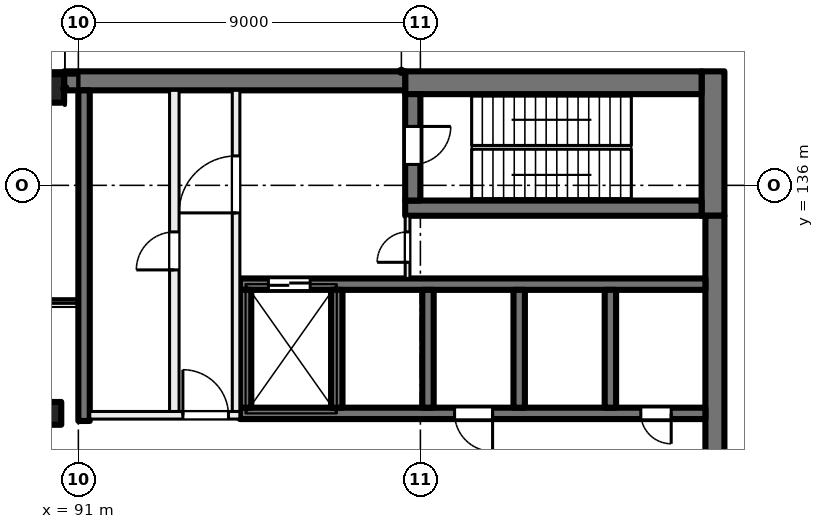
"""IFC4 building model, lengths in metres.
Left out: names, types, materials, properties, quantities, classifications, styles, units other than length and angle.
Written with IfcOpenShell. Run it as: python <this file> out.ifc"""

import sys

from ifc_helpers import new_model, si_unit, direction, frame, frame_2d, origin, origin_2d, place, context, subcontext, project, spatial, rectangle, extrude, element, fill, save


model = new_model("IFC4")
c1 = context("Model", 3, precision=1e-05, world=origin(), true_north=direction((0.0, 1.0)))
c2 = subcontext(c1, "Body", "Model", "MODEL_VIEW")
j1 = project(units=[si_unit("LENGTHUNIT", "METRE"), si_unit("PLANEANGLEUNIT", "RADIAN")], contexts=[c1])
p1 = place(None, origin())
s1 = spatial("IfcSite", under=j1, at=p1, CompositionType="ELEMENT")
p2 = place(p1, origin())
s2 = spatial("IfcBuilding", under=s1, at=p2, CompositionType="ELEMENT")
p3 = place(p2, frame((0.0, 0.0, 236.0)))
s3 = spatial("IfcBuildingStorey", under=s2, at=p3, CompositionType="ELEMENT", Elevation=236.0)
p4 = place(p3, frame((90.25, 130.0, 0.0), z_axis=(0.0, 0.0, 1.0), x_axis=(1.0, 0.0, 0.0)))
e1 = element("IfcColumn", 1, at=p4, inside=s3, PredefinedType="COLUMN", context=c2, shape_type="SweptSolid", body=[
    extrude(rectangle(XDim=0.6, YDim=0.6, at=origin_2d()), origin(), (0.0, 0.0, 1.0), 5.5),
])
p5 = place(p3, frame((90.25, 138.55, 0.0), z_axis=(0.0, 0.0, 1.0), x_axis=(1.0, 0.0, 0.0)))
e2 = element("IfcColumn", 2, at=p5, inside=s3, PredefinedType="COLUMN", context=c2, shape_type="SweptSolid", body=[
    extrude(rectangle(XDim=0.75, YDim=0.75, at=origin_2d()), origin(), (0.0, 0.0, 1.0), 5.5),
])
p6 = place(p3, frame((107.7, 139.0, 0.0), z_axis=(0.0, 0.0, 1.0), x_axis=(0.0, -1.0, 0.0)))
e3 = element("IfcWall", 3, at=p6, inside=s3, PredefinedType="SHEAR", context=c2, shape_type="SweptSolid", body=[
    extrude(rectangle(XDim=3.8, YDim=0.6, at=frame_2d((1.9, 0.0))), origin(), (0.0, 0.0, 1.0), 5.5),
])
p7 = place(p3, frame((107.75, 135.2, 0.0), z_axis=(0.0, 0.0, 1.0), x_axis=(0.0, -1.0, 0.0)))
e4 = element("IfcWall", 4, at=p7, inside=s3, PredefinedType="SHEAR", context=c2, shape_type="SweptSolid", body=[
    extrude(rectangle(XDim=14.4, YDim=0.5, at=frame_2d((7.2, 0.0))), origin(), (0.0, 0.0, 1.0), 5.5),
])
p8 = place(p3, frame((107.4, 138.7, 0.0), z_axis=(0.0, 0.0, 1.0), x_axis=(-1.0, 0.0, 0.0)))
e5 = element("IfcWall", 5, at=p8, inside=s3, PredefinedType="SHEAR", context=c2, shape_type="SweptSolid", body=[
    extrude(rectangle(XDim=7.8, YDim=0.6, at=frame_2d((3.9, 0.0))), origin(), (0.0, 0.0, 1.0), 5.5),
])
p9 = place(p3, frame((99.6, 138.75, 0.0), z_axis=(0.0, 0.0, 1.0), x_axis=(-1.0, 0.0, 0.0)))
e6 = element("IfcWall", 6, at=p9, inside=s3, PredefinedType="SHEAR", context=c2, shape_type="SweptSolid", body=[
    extrude(rectangle(XDim=8.975, YDim=0.5, at=frame_2d((4.488, 0.0))), origin(), (0.0, 0.0, 1.0), 5.5),
])
p10 = place(p3, frame((107.4, 135.4, 0.0), z_axis=(0.0, 0.0, 1.0), x_axis=(-1.0, 0.0, 0.0)))
e7 = element("IfcWall", 7, at=p10, inside=s3, PredefinedType="SHEAR", context=c2, shape_type="SweptSolid", body=[
    extrude(rectangle(XDim=7.8, YDim=0.4, at=frame_2d((3.9, 0.0))), origin(), (0.0, 0.0, 1.0), 5.5),
])
p11 = place(p3, frame((99.8, 138.4, 0.0), z_axis=(0.0, 0.0, 1.0), x_axis=(0.0, -1.0, 0.0)))
e8 = element("IfcWall", 8, at=p11, inside=s3, PredefinedType="SHEAR", context=c2, shape_type="SweptSolid", body=[
    extrude(rectangle(XDim=2.8, YDim=0.4, at=frame_2d((1.4, 0.0))), origin(), (0.0, 0.0, 1.0), 5.5),
])
p12 = place(p11, frame((0.85, 0.0, 0.0)))
e9 = element("IfcOpeningElement", 9, at=p12, cuts=e8, PredefinedType="OPENING", context=c2, shape_type="SweptSolid", body=[
    extrude(rectangle(XDim=1.0, YDim=2.1, at=frame_2d((0.5, 1.05))), frame((0.0, 0.21, 0.0), z_axis=(0.0, -1.0, 0.0), x_axis=(1.0, 0.0, 0.0)), (0.0, 0.0, 1.0), 0.42),
])
p13 = place(p3, frame((107.5, 130.0, 0.0), z_axis=(0.0, 0.0, 1.0), x_axis=(-1.0, 0.0, 0.0)))
e10 = element("IfcWall", 10, at=p13, inside=s3, PredefinedType="SHEAR", context=c2, shape_type="SweptSolid", body=[
    extrude(rectangle(XDim=12.25, YDim=0.3, at=frame_2d((6.125, 0.0))), origin(), (0.0, 0.0, 1.0), 5.5),
])
p14 = place(p13, frame((0.9, 0.0, 0.0)))
e11 = element("IfcOpeningElement", 11, at=p14, cuts=e10, PredefinedType="OPENING", context=c2, shape_type="SweptSolid", body=[
    extrude(rectangle(XDim=0.8, YDim=2.1, at=frame_2d((0.4, 1.05))), frame((0.0, 0.16, 0.0), z_axis=(0.0, -1.0, 0.0), x_axis=(1.0, 0.0, 0.0)), (0.0, 0.0, 1.0), 0.32),
])
p15 = place(p13, frame((5.6, 0.0, 0.0)))
e12 = element("IfcOpeningElement", 12, at=p15, cuts=e10, PredefinedType="OPENING", context=c2, shape_type="SweptSolid", body=[
    extrude(rectangle(XDim=1.0, YDim=2.1, at=frame_2d((0.5, 1.05))), frame((0.0, 0.16, 0.0), z_axis=(0.0, -1.0, 0.0), x_axis=(1.0, 0.0, 0.0)), (0.0, 0.0, 1.0), 0.32),
])
p16 = place(p3, frame((107.5, 133.4, 0.0), z_axis=(0.0, 0.0, 1.0), x_axis=(-1.0, 0.0, 0.0)))
e13 = element("IfcWall", 13, at=p16, inside=s3, PredefinedType="SHEAR", context=c2, shape_type="SweptSolid", body=[
    extrude(rectangle(XDim=12.25, YDim=0.3, at=frame_2d((6.125, 0.0))), origin(), (0.0, 0.0, 1.0), 5.5),
])
p17 = place(p16, frame((10.4, 0.0, 0.0)))
e14 = element("IfcOpeningElement", 14, at=p17, cuts=e13, PredefinedType="OPENING", context=c2, shape_type="SweptSolid", body=[
    extrude(rectangle(XDim=1.1, YDim=2.1, at=frame_2d((0.55, 1.05))), frame((0.0, 0.16, 0.0), z_axis=(0.0, -1.0, 0.0), x_axis=(1.0, 0.0, 0.0)), (0.0, 0.0, 1.0), 0.32),
])
for number, where, z_axis, x_axis in (
    (15, (105.0, 133.25, 0.0), (0.0, 0.0, 1.0), (0.0, -1.0, 0.0)),
    (16, (102.6, 133.25, 0.0), (0.0, 0.0, 1.0), (0.0, -1.0, 0.0)),
    (17, (100.2, 133.25, 0.0), (0.0, 0.0, 1.0), (0.0, -1.0, 0.0)),
    (18, (97.8, 133.25, 0.0), (0.0, 0.0, 1.0), (0.0, -1.0, 0.0)),
    (19, (95.4, 133.25, 0.0), (0.0, 0.0, 1.0), (0.0, -1.0, 0.0)),
):
    element("IfcWall", number, at=place(p3, frame(where, z_axis=z_axis, x_axis=x_axis)), inside=s3, PredefinedType="SHEAR", context=c2, shape_type="SweptSolid", body=[
        extrude(rectangle(XDim=3.1, YDim=0.3, at=frame_2d((1.55, 0.0))), origin(), (0.0, 0.0, 1.0), 5.5),
    ])
p18 = place(p3, frame((91.15, 138.5, 0.0), z_axis=(0.0, 0.0, 1.0), x_axis=(0.0, -1.0, 0.0)))
e20 = element("IfcWall", 20, at=p18, inside=s3, PredefinedType="SHEAR", context=c2, shape_type="SweptSolid", body=[
    extrude(rectangle(XDim=8.7, YDim=0.3, at=frame_2d((4.35, 0.0))), origin(), (0.0, 0.0, 1.0), 5.5),
])
p19 = place(p3, frame((91.3, 129.95, 0.0), z_axis=(0.0, 0.0, 1.0), x_axis=(1.0, 0.0, 0.0)))
e21 = element("IfcWall", 21, at=p19, inside=s3, PredefinedType="PARTITIONING", context=c2, shape_type="SweptSolid", body=[
    extrude(rectangle(XDim=3.95, YDim=0.2, at=frame_2d((1.975, 0.0))), origin(), (0.0, 0.0, 1.0), 5.125),
])
p20 = place(p19, frame((2.45, 0.0, 0.0)))
e22 = element("IfcOpeningElement", 22, at=p20, cuts=e21, PredefinedType="OPENING", context=c2, shape_type="SweptSolid", body=[
    extrude(rectangle(XDim=1.2, YDim=2.1, at=frame_2d((0.6, 1.05))), frame((0.0, 0.11, 0.0), z_axis=(0.0, -1.0, 0.0), x_axis=(1.0, 0.0, 0.0)), (0.0, 0.0, 1.0), 0.22),
])
p21 = place(p3, frame((95.15, 130.05, 0.0), z_axis=(0.0, 0.0, 1.0), x_axis=(0.0, 1.0, 0.0)))
e23 = element("IfcWall", 23, at=p21, inside=s3, PredefinedType="PARTITIONING", context=c2, shape_type="SweptSolid", body=[
    extrude(rectangle(XDim=8.45, YDim=0.2, at=frame_2d((4.225, 0.0))), origin(), (0.0, 0.0, 1.0), 5.125),
])
p22 = place(p21, frame((5.225, 0.0, 0.0)))
e24 = element("IfcOpeningElement", 24, at=p22, cuts=e23, PredefinedType="OPENING", context=c2, shape_type="SweptSolid", body=[
    extrude(rectangle(XDim=1.5, YDim=2.1, at=frame_2d((0.75, 1.05))), frame((0.0, 0.11, 0.0), z_axis=(0.0, -1.0, 0.0), x_axis=(1.0, 0.0, 0.0)), (0.0, 0.0, 1.0), 0.22),
])
p23 = place(p3, frame((93.525, 130.05, 0.0), z_axis=(0.0, 0.0, 1.0), x_axis=(0.0, 1.0, 0.0)))
e25 = element("IfcWall", 25, at=p23, inside=s3, PredefinedType="PARTITIONING", context=c2, shape_type="SweptSolid", body=[
    extrude(rectangle(XDim=8.45, YDim=0.25, at=frame_2d((4.225, 0.0))), origin(), (0.0, 0.0, 1.0), 5.125),
])
p24 = place(p23, frame((3.725, 0.0, 0.0)))
e26 = element("IfcOpeningElement", 26, at=p24, cuts=e25, PredefinedType="OPENING", context=c2, shape_type="SweptSolid", body=[
    extrude(rectangle(XDim=1.0, YDim=2.1, at=frame_2d((0.5, 1.05))), frame((0.0, 0.135, 0.0), z_axis=(0.0, -1.0, 0.0), x_axis=(1.0, 0.0, 0.0)), (0.0, 0.0, 1.0), 0.27),
])
p25 = place(p3, frame((99.663, 133.55, 0.0), z_axis=(0.0, 0.0, 1.0), x_axis=(0.0, 1.0, 0.0)))
e27 = element("IfcWall", 27, at=p25, inside=s3, PredefinedType="PARTITIONING", context=c2, shape_type="SweptSolid", body=[
    extrude(rectangle(XDim=1.65, YDim=0.125, at=frame_2d((0.825, 0.0))), origin(), (0.0, 0.0, 1.0), 5.125),
])
p26 = place(p25, frame((0.425, 0.0, 0.0)))
e28 = element("IfcOpeningElement", 28, at=p26, cuts=e27, PredefinedType="OPENING", context=c2, shape_type="SweptSolid", body=[
    extrude(rectangle(XDim=0.8, YDim=2.1, at=frame_2d((0.4, 1.05))), frame((0.0, 0.073, 0.0), z_axis=(0.0, -1.0, 0.0), x_axis=(1.0, 0.0, 0.0)), (0.0, 0.0, 1.0), 0.145),
])
p27 = place(p14, origin())
e29 = element("IfcDoor", 29, at=p27, inside=s3, OperationType="SINGLE_SWING_LEFT", PredefinedType="DOOR", context=c2, shape_type="SweptSolid", body=[
    extrude(rectangle(XDim=0.8, YDim=2.1, at=frame_2d((0.4, 1.05))), frame((0.0, 0.025, 0.0), z_axis=(0.0, -1.0, 0.0), x_axis=(1.0, 0.0, 0.0)), (0.0, 0.0, 1.0), 0.05),
])
fill(e11, e29)
p28 = place(p15, origin())
e30 = element("IfcDoor", 30, at=p28, inside=s3, OperationType="SINGLE_SWING_RIGHT", PredefinedType="DOOR", context=c2, shape_type="SweptSolid", body=[
    extrude(rectangle(XDim=1.0, YDim=2.1, at=frame_2d((0.5, 1.05))), frame((0.0, 0.025, 0.0), z_axis=(0.0, -1.0, 0.0), x_axis=(1.0, 0.0, 0.0)), (0.0, 0.0, 1.0), 0.05),
])
fill(e12, e30)
p29 = place(p20, origin())
e31 = element("IfcDoor", 31, at=p29, inside=s3, OperationType="DOUBLE_DOOR_SINGLE_SWING", PredefinedType="DOOR", context=c2, shape_type="SweptSolid", body=[
    extrude(rectangle(XDim=1.2, YDim=2.1, at=frame_2d((0.6, 1.05))), frame((0.0, 0.025, 0.0), z_axis=(0.0, -1.0, 0.0), x_axis=(1.0, 0.0, 0.0)), (0.0, 0.0, 1.0), 0.05),
])
fill(e22, e31)
p30 = place(p22, origin())
e32 = element("IfcDoor", 32, at=p30, inside=s3, OperationType="DOUBLE_DOOR_SINGLE_SWING", PredefinedType="DOOR", context=c2, shape_type="SweptSolid", body=[
    extrude(rectangle(XDim=1.5, YDim=2.1, at=frame_2d((0.75, 1.05))), frame((0.0, 0.025, 0.0), z_axis=(0.0, -1.0, 0.0), x_axis=(1.0, 0.0, 0.0)), (0.0, 0.0, 1.0), 0.05),
])
fill(e24, e32)
p31 = place(p12, origin())
e33 = element("IfcDoor", 33, at=p31, inside=s3, OperationType="SINGLE_SWING_RIGHT", PredefinedType="DOOR", context=c2, shape_type="SweptSolid", body=[
    extrude(rectangle(XDim=1.0, YDim=2.1, at=frame_2d((0.5, 1.05))), frame((0.0, 0.025, 0.0), z_axis=(0.0, -1.0, 0.0), x_axis=(1.0, 0.0, 0.0)), (0.0, 0.0, 1.0), 0.05),
])
fill(e9, e33)
p32 = place(p26, origin())
e34 = element("IfcDoor", 34, at=p32, inside=s3, OperationType="SINGLE_SWING_LEFT", PredefinedType="DOOR", context=c2, shape_type="SweptSolid", body=[
    extrude(rectangle(XDim=0.8, YDim=2.1, at=frame_2d((0.4, 1.05))), frame((0.0, 0.025, 0.0), z_axis=(0.0, -1.0, 0.0), x_axis=(1.0, 0.0, 0.0)), (0.0, 0.0, 1.0), 0.05),
])
fill(e28, e34)
p33 = place(p24, origin())
e35 = element("IfcDoor", 35, at=p33, inside=s3, OperationType="SINGLE_SWING_RIGHT", PredefinedType="DOOR", context=c2, shape_type="SweptSolid", body=[
    extrude(rectangle(XDim=1.0, YDim=2.1, at=frame_2d((0.5, 1.05))), frame((0.0, 0.025, 0.0), z_axis=(0.0, -1.0, 0.0), x_axis=(1.0, 0.0, 0.0)), (0.0, 0.0, 1.0), 0.05),
])
fill(e26, e35)
p34 = place(p17, origin())
e36 = element("IfcDoor", 36, at=p34, inside=s3, OperationType="DOUBLE_DOOR_SLIDING", PredefinedType="DOOR", context=c2, shape_type="SweptSolid", body=[
    extrude(rectangle(XDim=1.1, YDim=2.1, at=frame_2d((0.55, 1.05))), frame((0.0, 0.025, 0.0), z_axis=(0.0, -1.0, 0.0), x_axis=(1.0, 0.0, 0.0)), (0.0, 0.0, 1.0), 0.05),
])
fill(e14, e36)
save(model, sys.argv[1])
